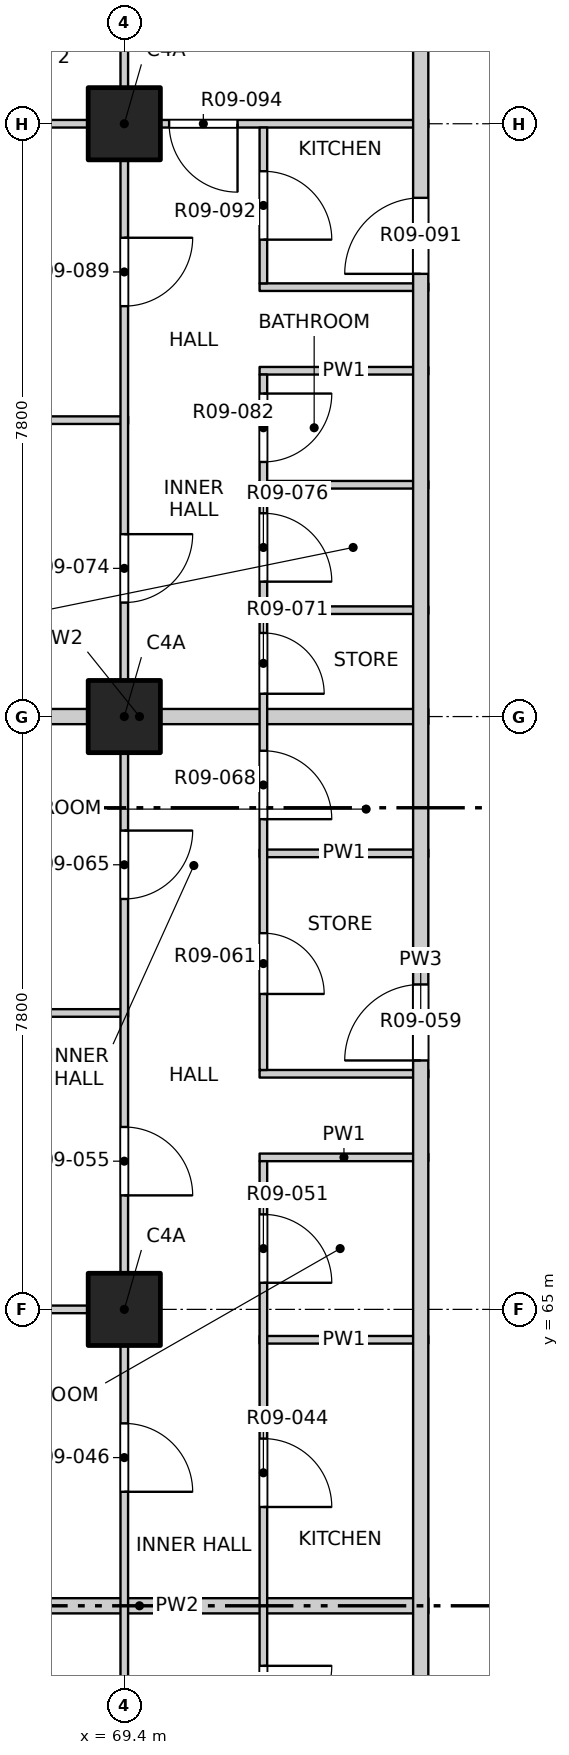
"""IFC4 building model, lengths in metres.
Left out: names, types, materials, properties, quantities, classifications, styles, units other than length and angle.
Written with IfcOpenShell. Run it as: python <this file> out.ifc"""

import sys

from ifc_helpers import new_model, si_unit, direction, frame, frame_2d, origin, origin_2d, place, context, subcontext, project, spatial, rectangle, extrude, element, fill, save


model = new_model("IFC4")
c1 = context("Model", 3, precision=1e-05, world=origin(), true_north=direction((0.0, 1.0)))
c2 = subcontext(c1, "Body", "Model", "MODEL_VIEW")
j1 = project(units=[si_unit("LENGTHUNIT", "METRE"), si_unit("PLANEANGLEUNIT", "RADIAN")], contexts=[c1])
p1 = place(None, origin())
s1 = spatial("IfcSite", under=j1, at=p1, CompositionType="ELEMENT")
p2 = place(p1, origin())
s2 = spatial("IfcBuilding", under=s1, at=p2, CompositionType="ELEMENT")
p3 = place(p2, frame((0.0, 0.0, 113.5)))
s3 = spatial("IfcBuildingStorey", under=s2, at=p3, CompositionType="ELEMENT", Elevation=113.5)
for number, where, z_axis, x_axis in (
    (1, (69.4, 65.0, -0.25), (0.0, 0.0, 1.0), (1.0, 0.0, 0.0)),
    (2, (69.4, 72.8, -0.25), (0.0, 0.0, 1.0), (1.0, 0.0, 0.0)),
    (3, (69.4, 80.6, -0.25), (0.0, 0.0, 1.0), (1.0, 0.0, 0.0)),
):
    element("IfcColumn", number, at=place(p3, frame(where, z_axis=z_axis, x_axis=x_axis)), inside=s3, PredefinedType="COLUMN", context=c2, shape_type="SweptSolid", body=[
        extrude(rectangle(XDim=0.95, YDim=0.95, at=origin_2d()), origin(), (0.0, 0.0, 1.0), 3.35),
    ])
p4 = place(p3, frame((65.8, 61.1, 0.0), z_axis=(0.0, 0.0, 1.0), x_axis=(1.0, 0.0, 0.0)))
e4 = element("IfcWall", 4, at=p4, inside=s3, PredefinedType="PARTITIONING", context=c2, shape_type="SweptSolid", body=[
    extrude(rectangle(XDim=7.6, YDim=0.2, at=frame_2d((3.8, 0.0))), origin(), (0.0, 0.0, 1.0), 3.1),
])
p5 = place(p3, frame((71.18, 64.6, 0.0), z_axis=(0.0, 0.0, 1.0), x_axis=(1.0, 0.0, 0.0)))
e5 = element("IfcWall", 5, at=p5, inside=s3, PredefinedType="PARTITIONING", context=c2, shape_type="SweptSolid", body=[
    extrude(rectangle(XDim=2.22, YDim=0.1, at=frame_2d((1.11, 0.0))), origin(), (0.0, 0.0, 1.0), 3.1),
])
p6 = place(p3, frame((65.8, 65.0, 0.0), z_axis=(0.0, 0.0, 1.0), x_axis=(1.0, 0.0, 0.0)))
e6 = element("IfcWall", 6, at=p6, inside=s3, PredefinedType="PARTITIONING", context=c2, shape_type="SweptSolid", body=[
    extrude(rectangle(XDim=3.65, YDim=0.1, at=frame_2d((1.825, 0.0))), origin(), (0.0, 0.0, 1.0), 3.1),
])
for number, where, z_axis, x_axis in (
    (7, (71.18, 67.0, 0.0), (0.0, 0.0, 1.0), (1.0, 0.0, 0.0)),
    (8, (71.18, 68.1, 0.0), (0.0, 0.0, 1.0), (1.0, 0.0, 0.0)),
):
    element("IfcWall", number, at=place(p3, frame(where, z_axis=z_axis, x_axis=x_axis)), inside=s3, PredefinedType="PARTITIONING", context=c2, shape_type="SweptSolid", body=[
        extrude(rectangle(XDim=2.22, YDim=0.1, at=frame_2d((1.11, 0.0))), origin(), (0.0, 0.0, 1.0), 3.1),
    ])
p7 = place(p3, frame((65.8, 68.9, 0.0), z_axis=(0.0, 0.0, 1.0), x_axis=(1.0, 0.0, 0.0)))
e9 = element("IfcWall", 9, at=p7, inside=s3, PredefinedType="PARTITIONING", context=c2, shape_type="SweptSolid", body=[
    extrude(rectangle(XDim=3.65, YDim=0.1, at=frame_2d((1.825, 0.0))), origin(), (0.0, 0.0, 1.0), 3.1),
])
p8 = place(p3, frame((71.18, 71.0, 0.0), z_axis=(0.0, 0.0, 1.0), x_axis=(1.0, 0.0, 0.0)))
e10 = element("IfcWall", 10, at=p8, inside=s3, PredefinedType="PARTITIONING", context=c2, shape_type="SweptSolid", body=[
    extrude(rectangle(XDim=2.22, YDim=0.1, at=frame_2d((1.11, 0.0))), origin(), (0.0, 0.0, 1.0), 3.1),
])
p9 = place(p3, frame((65.8, 72.8, 0.0), z_axis=(0.0, 0.0, 1.0), x_axis=(1.0, 0.0, 0.0)))
e11 = element("IfcWall", 11, at=p9, inside=s3, PredefinedType="PARTITIONING", context=c2, shape_type="SweptSolid", body=[
    extrude(rectangle(XDim=7.6, YDim=0.2, at=frame_2d((3.8, 0.0))), origin(), (0.0, 0.0, 1.0), 3.1),
])
for number, where, z_axis, x_axis in (
    (12, (71.18, 74.2, 0.0), (0.0, 0.0, 1.0), (1.0, 0.0, 0.0)),
    (13, (71.18, 75.85, 0.0), (0.0, 0.0, 1.0), (1.0, 0.0, 0.0)),
):
    element("IfcWall", number, at=place(p3, frame(where, z_axis=z_axis, x_axis=x_axis)), inside=s3, PredefinedType="PARTITIONING", context=c2, shape_type="SweptSolid", body=[
        extrude(rectangle(XDim=2.22, YDim=0.1, at=frame_2d((1.11, 0.0))), origin(), (0.0, 0.0, 1.0), 3.1),
    ])
p10 = place(p3, frame((65.8, 76.7, 0.0), z_axis=(0.0, 0.0, 1.0), x_axis=(1.0, 0.0, 0.0)))
e14 = element("IfcWall", 14, at=p10, inside=s3, PredefinedType="PARTITIONING", context=c2, shape_type="SweptSolid", body=[
    extrude(rectangle(XDim=3.65, YDim=0.1, at=frame_2d((1.825, 0.0))), origin(), (0.0, 0.0, 1.0), 3.1),
])
for number, where, z_axis, x_axis in (
    (15, (71.18, 77.35, 0.0), (0.0, 0.0, 1.0), (1.0, 0.0, 0.0)),
    (16, (71.18, 78.45, 0.0), (0.0, 0.0, 1.0), (1.0, 0.0, 0.0)),
):
    element("IfcWall", number, at=place(p3, frame(where, z_axis=z_axis, x_axis=x_axis)), inside=s3, PredefinedType="PARTITIONING", context=c2, shape_type="SweptSolid", body=[
        extrude(rectangle(XDim=2.22, YDim=0.1, at=frame_2d((1.11, 0.0))), origin(), (0.0, 0.0, 1.0), 3.1),
    ])
p11 = place(p3, frame((65.8, 80.6, 0.0), z_axis=(0.0, 0.0, 1.0), x_axis=(1.0, 0.0, 0.0)))
e17 = element("IfcWall", 17, at=p11, inside=s3, PredefinedType="PARTITIONING", context=c2, shape_type="SweptSolid", body=[
    extrude(rectangle(XDim=7.6, YDim=0.1, at=frame_2d((3.8, 0.0))), origin(), (0.0, 0.0, 1.0), 3.1),
])
p12 = place(p11, frame((4.19, 0.0, 0.0)))
e18 = element("IfcOpeningElement", 18, at=p12, cuts=e17, PredefinedType="OPENING", context=c2, shape_type="SweptSolid", body=[
    extrude(rectangle(XDim=0.9, YDim=2.1, at=frame_2d((0.45, 1.05))), frame((0.0, 0.06, 0.0), z_axis=(0.0, -1.0, 0.0), x_axis=(1.0, 0.0, 0.0)), (0.0, 0.0, 1.0), 0.12),
])
p13 = place(p3, frame((69.4, 45.8, 0.0), z_axis=(0.0, 0.0, 1.0), x_axis=(0.0, 1.0, 0.0)))
e19 = element("IfcWall", 19, at=p13, inside=s3, PredefinedType="PARTITIONING", context=c2, shape_type="SweptSolid", body=[
    extrude(rectangle(XDim=38.4, YDim=0.1, at=frame_2d((19.2, 0.0))), origin(), (0.0, 0.0, 1.0), 3.1),
])
p14 = place(p13, frame((1.05, 0.0, 0.0)))
e20 = element("IfcOpeningElement", 20, at=p14, cuts=e19, PredefinedType="OPENING", context=c2, shape_type="SweptSolid", body=[
    extrude(rectangle(XDim=1.2, YDim=2.1, at=frame_2d((0.6, 1.05))), frame((0.0, 0.06, 0.0), z_axis=(0.0, -1.0, 0.0), x_axis=(1.0, 0.0, 0.0)), (0.0, 0.0, 1.0), 0.12),
])
p15 = place(p13, frame((5.1, 0.0, 0.0)))
e21 = element("IfcOpeningElement", 21, at=p15, cuts=e19, PredefinedType="OPENING", context=c2, shape_type="SweptSolid", body=[
    extrude(rectangle(XDim=0.9, YDim=2.1, at=frame_2d((0.45, 1.05))), frame((0.0, 0.06, 0.0), z_axis=(0.0, -1.0, 0.0), x_axis=(1.0, 0.0, 0.0)), (0.0, 0.0, 1.0), 0.12),
])
p16 = place(p13, frame((9.0, 0.0, 0.0)))
e22 = element("IfcOpeningElement", 22, at=p16, cuts=e19, PredefinedType="OPENING", context=c2, shape_type="SweptSolid", body=[
    extrude(rectangle(XDim=0.9, YDim=2.1, at=frame_2d((0.45, 1.05))), frame((0.0, 0.06, 0.0), z_axis=(0.0, -1.0, 0.0), x_axis=(1.0, 0.0, 0.0)), (0.0, 0.0, 1.0), 0.12),
])
p17 = place(p13, frame((12.9, 0.0, 0.0)))
e23 = element("IfcOpeningElement", 23, at=p17, cuts=e19, PredefinedType="OPENING", context=c2, shape_type="SweptSolid", body=[
    extrude(rectangle(XDim=0.9, YDim=2.1, at=frame_2d((0.45, 1.05))), frame((0.0, 0.06, 0.0), z_axis=(0.0, -1.0, 0.0), x_axis=(1.0, 0.0, 0.0)), (0.0, 0.0, 1.0), 0.12),
])
p18 = place(p13, frame((16.8, 0.0, 0.0)))
e24 = element("IfcOpeningElement", 24, at=p18, cuts=e19, PredefinedType="OPENING", context=c2, shape_type="SweptSolid", body=[
    extrude(rectangle(XDim=0.9, YDim=2.1, at=frame_2d((0.45, 1.05))), frame((0.0, 0.06, 0.0), z_axis=(0.0, -1.0, 0.0), x_axis=(1.0, 0.0, 0.0)), (0.0, 0.0, 1.0), 0.12),
])
p19 = place(p13, frame((20.7, 0.0, 0.0)))
e25 = element("IfcOpeningElement", 25, at=p19, cuts=e19, PredefinedType="OPENING", context=c2, shape_type="SweptSolid", body=[
    extrude(rectangle(XDim=0.9, YDim=2.1, at=frame_2d((0.45, 1.05))), frame((0.0, 0.06, 0.0), z_axis=(0.0, -1.0, 0.0), x_axis=(1.0, 0.0, 0.0)), (0.0, 0.0, 1.0), 0.12),
])
p20 = place(p13, frame((24.6, 0.0, 0.0)))
e26 = element("IfcOpeningElement", 26, at=p20, cuts=e19, PredefinedType="OPENING", context=c2, shape_type="SweptSolid", body=[
    extrude(rectangle(XDim=0.9, YDim=2.1, at=frame_2d((0.45, 1.05))), frame((0.0, 0.06, 0.0), z_axis=(0.0, -1.0, 0.0), x_axis=(1.0, 0.0, 0.0)), (0.0, 0.0, 1.0), 0.12),
])
p21 = place(p13, frame((28.5, 0.0, 0.0)))
e27 = element("IfcOpeningElement", 27, at=p21, cuts=e19, PredefinedType="OPENING", context=c2, shape_type="SweptSolid", body=[
    extrude(rectangle(XDim=0.9, YDim=2.1, at=frame_2d((0.45, 1.05))), frame((0.0, 0.06, 0.0), z_axis=(0.0, -1.0, 0.0), x_axis=(1.0, 0.0, 0.0)), (0.0, 0.0, 1.0), 0.12),
])
p22 = place(p13, frame((32.4, 0.0, 0.0)))
e28 = element("IfcOpeningElement", 28, at=p22, cuts=e19, PredefinedType="OPENING", context=c2, shape_type="SweptSolid", body=[
    extrude(rectangle(XDim=0.9, YDim=2.1, at=frame_2d((0.45, 1.05))), frame((0.0, 0.06, 0.0), z_axis=(0.0, -1.0, 0.0), x_axis=(1.0, 0.0, 0.0)), (0.0, 0.0, 1.0), 0.12),
])
p23 = place(p13, frame((36.15, 0.0, 0.0)))
e29 = element("IfcOpeningElement", 29, at=p23, cuts=e19, PredefinedType="OPENING", context=c2, shape_type="SweptSolid", body=[
    extrude(rectangle(XDim=1.2, YDim=2.1, at=frame_2d((0.6, 1.05))), frame((0.0, 0.06, 0.0), z_axis=(0.0, -1.0, 0.0), x_axis=(1.0, 0.0, 0.0)), (0.0, 0.0, 1.0), 0.12),
])
p24 = place(p3, frame((71.23, 55.3, 0.0), z_axis=(0.0, 0.0, 1.0), x_axis=(0.0, 1.0, 0.0)))
e30 = element("IfcWall", 30, at=p24, inside=s3, PredefinedType="PARTITIONING", context=c2, shape_type="SweptSolid", body=[
    extrude(rectangle(XDim=11.65, YDim=0.1, at=frame_2d((5.825, 0.0))), origin(), (0.0, 0.0, 1.0), 3.1),
])
p25 = place(p24, frame((1.185, 0.0, 0.0)))
e31 = element("IfcOpeningElement", 31, at=p25, cuts=e30, PredefinedType="OPENING", context=c2, shape_type="SweptSolid", body=[
    extrude(rectangle(XDim=0.9, YDim=2.1, at=frame_2d((0.45, 1.05))), frame((0.0, 0.06, 0.0), z_axis=(0.0, -1.0, 0.0), x_axis=(1.0, 0.0, 0.0)), (0.0, 0.0, 1.0), 0.12),
])
p26 = place(p24, frame((4.11, 0.0, 0.0)))
e32 = element("IfcOpeningElement", 32, at=p26, cuts=e30, PredefinedType="OPENING", context=c2, shape_type="SweptSolid", body=[
    extrude(rectangle(XDim=0.9, YDim=2.1, at=frame_2d((0.45, 1.05))), frame((0.0, 0.06, 0.0), z_axis=(0.0, -1.0, 0.0), x_axis=(1.0, 0.0, 0.0)), (0.0, 0.0, 1.0), 0.12),
])
p27 = place(p24, frame((7.1, 0.0, 0.0)))
e33 = element("IfcOpeningElement", 33, at=p27, cuts=e30, PredefinedType="OPENING", context=c2, shape_type="SweptSolid", body=[
    extrude(rectangle(XDim=0.9, YDim=2.1, at=frame_2d((0.45, 1.05))), frame((0.0, 0.06, 0.0), z_axis=(0.0, -1.0, 0.0), x_axis=(1.0, 0.0, 0.0)), (0.0, 0.0, 1.0), 0.12),
])
p28 = place(p24, frame((10.05, 0.0, 0.0)))
e34 = element("IfcOpeningElement", 34, at=p28, cuts=e30, PredefinedType="OPENING", context=c2, shape_type="SweptSolid", body=[
    extrude(rectangle(XDim=0.9, YDim=2.1, at=frame_2d((0.45, 1.05))), frame((0.0, 0.06, 0.0), z_axis=(0.0, -1.0, 0.0), x_axis=(1.0, 0.0, 0.0)), (0.0, 0.0, 1.0), 0.12),
])
p29 = place(p3, frame((71.23, 68.15, 0.0), z_axis=(0.0, 0.0, 1.0), x_axis=(0.0, 1.0, 0.0)))
e35 = element("IfcWall", 35, at=p29, inside=s3, PredefinedType="PARTITIONING", context=c2, shape_type="SweptSolid", body=[
    extrude(rectangle(XDim=9.15, YDim=0.1, at=frame_2d((4.575, 0.0))), origin(), (0.0, 0.0, 1.0), 3.1),
])
p30 = place(p29, frame((1.0, 0.0, 0.0)))
e36 = element("IfcOpeningElement", 36, at=p30, cuts=e35, PredefinedType="OPENING", context=c2, shape_type="SweptSolid", body=[
    extrude(rectangle(XDim=0.8, YDim=2.1, at=frame_2d((0.4, 1.05))), frame((0.0, 0.06, 0.0), z_axis=(0.0, -1.0, 0.0), x_axis=(1.0, 0.0, 0.0)), (0.0, 0.0, 1.0), 0.12),
])
p31 = place(p29, frame((3.3, 0.0, 0.0)))
e37 = element("IfcOpeningElement", 37, at=p31, cuts=e35, PredefinedType="OPENING", context=c2, shape_type="SweptSolid", body=[
    extrude(rectangle(XDim=0.9, YDim=2.1, at=frame_2d((0.45, 1.05))), frame((0.0, 0.06, 0.0), z_axis=(0.0, -1.0, 0.0), x_axis=(1.0, 0.0, 0.0)), (0.0, 0.0, 1.0), 0.12),
])
p32 = place(p29, frame((4.95, 0.0, 0.0)))
e38 = element("IfcOpeningElement", 38, at=p32, cuts=e35, PredefinedType="OPENING", context=c2, shape_type="SweptSolid", body=[
    extrude(rectangle(XDim=0.8, YDim=2.1, at=frame_2d((0.4, 1.05))), frame((0.0, 0.06, 0.0), z_axis=(0.0, -1.0, 0.0), x_axis=(1.0, 0.0, 0.0)), (0.0, 0.0, 1.0), 0.12),
])
p33 = place(p29, frame((6.425, 0.0, 0.0)))
e39 = element("IfcOpeningElement", 39, at=p33, cuts=e35, PredefinedType="OPENING", context=c2, shape_type="SweptSolid", body=[
    extrude(rectangle(XDim=0.9, YDim=2.1, at=frame_2d((0.45, 1.05))), frame((0.0, 0.06, 0.0), z_axis=(0.0, -1.0, 0.0), x_axis=(1.0, 0.0, 0.0)), (0.0, 0.0, 1.0), 0.12),
])
p34 = place(p29, frame((8.0, 0.0, 0.0)))
e40 = element("IfcOpeningElement", 40, at=p34, cuts=e35, PredefinedType="OPENING", context=c2, shape_type="SweptSolid", body=[
    extrude(rectangle(XDim=0.9, YDim=2.1, at=frame_2d((0.45, 1.05))), frame((0.0, 0.06, 0.0), z_axis=(0.0, -1.0, 0.0), x_axis=(1.0, 0.0, 0.0)), (0.0, 0.0, 1.0), 0.12),
])
p35 = place(p3, frame((71.23, 78.5, 0.0), z_axis=(0.0, 0.0, 1.0), x_axis=(0.0, 1.0, 0.0)))
e41 = element("IfcWall", 41, at=p35, inside=s3, PredefinedType="PARTITIONING", context=c2, shape_type="SweptSolid", body=[
    extrude(rectangle(XDim=2.05, YDim=0.1, at=frame_2d((1.025, 0.0))), origin(), (0.0, 0.0, 1.0), 3.1),
])
p36 = place(p35, frame((0.575, 0.0, 0.0)))
e42 = element("IfcOpeningElement", 42, at=p36, cuts=e41, PredefinedType="OPENING", context=c2, shape_type="SweptSolid", body=[
    extrude(rectangle(XDim=0.9, YDim=2.1, at=frame_2d((0.45, 1.05))), frame((0.0, 0.06, 0.0), z_axis=(0.0, -1.0, 0.0), x_axis=(1.0, 0.0, 0.0)), (0.0, 0.0, 1.0), 0.12),
])
p37 = place(p3, frame((73.3, 53.4, 0.0), z_axis=(0.0, 0.0, 1.0), x_axis=(0.0, 1.0, 0.0)))
e43 = element("IfcWall", 43, at=p37, inside=s3, PredefinedType="PARTITIONING", context=c2, shape_type="SweptSolid", body=[
    extrude(rectangle(XDim=30.8, YDim=0.2, at=frame_2d((15.4, 0.0))), origin(), (0.0, 0.0, 1.0), 3.1),
])
p38 = place(p37, frame((2.025, 0.0, 0.0)))
e44 = element("IfcOpeningElement", 44, at=p38, cuts=e43, PredefinedType="OPENING", context=c2, shape_type="SweptSolid", body=[
    extrude(rectangle(XDim=1.0, YDim=2.1, at=frame_2d((0.5, 1.05))), frame((0.0, 0.11, 0.0), z_axis=(0.0, -1.0, 0.0), x_axis=(1.0, 0.0, 0.0)), (0.0, 0.0, 1.0), 0.22),
])
p39 = place(p37, frame((14.875, 0.0, 0.0)))
e45 = element("IfcOpeningElement", 45, at=p39, cuts=e43, PredefinedType="OPENING", context=c2, shape_type="SweptSolid", body=[
    extrude(rectangle(XDim=1.0, YDim=2.1, at=frame_2d((0.5, 1.05))), frame((0.0, 0.11, 0.0), z_axis=(0.0, -1.0, 0.0), x_axis=(1.0, 0.0, 0.0)), (0.0, 0.0, 1.0), 0.22),
])
p40 = place(p37, frame((25.225, 0.0, 0.0)))
e46 = element("IfcOpeningElement", 46, at=p40, cuts=e43, PredefinedType="OPENING", context=c2, shape_type="SweptSolid", body=[
    extrude(rectangle(XDim=1.0, YDim=2.1, at=frame_2d((0.5, 1.05))), frame((0.0, 0.11, 0.0), z_axis=(0.0, -1.0, 0.0), x_axis=(1.0, 0.0, 0.0)), (0.0, 0.0, 1.0), 0.22),
])
p41 = place(p26, origin())
e47 = element("IfcDoor", 47, at=p41, inside=s3, OperationType="SINGLE_SWING_LEFT", PredefinedType="DOOR", context=c2, shape_type="SweptSolid", body=[
    extrude(rectangle(XDim=0.9, YDim=2.1, at=frame_2d((0.45, 1.05))), frame((0.0, 0.025, 0.0), z_axis=(0.0, -1.0, 0.0), x_axis=(1.0, 0.0, 0.0)), (0.0, 0.0, 1.0), 0.05),
])
fill(e32, e47)
p42 = place(p27, origin())
e48 = element("IfcDoor", 48, at=p42, inside=s3, OperationType="SINGLE_SWING_RIGHT", PredefinedType="DOOR", context=c2, shape_type="SweptSolid", body=[
    extrude(rectangle(XDim=0.9, YDim=2.1, at=frame_2d((0.45, 1.05))), frame((0.0, 0.025, 0.0), z_axis=(0.0, -1.0, 0.0), x_axis=(1.0, 0.0, 0.0)), (0.0, 0.0, 1.0), 0.05),
])
fill(e33, e48)
p43 = place(p18, origin())
e49 = element("IfcDoor", 49, at=p43, inside=s3, OperationType="SINGLE_SWING_RIGHT", PredefinedType="DOOR", context=c2, shape_type="SweptSolid", body=[
    extrude(rectangle(XDim=0.9, YDim=2.1, at=frame_2d((0.45, 1.05))), frame((0.0, 0.025, 0.0), z_axis=(0.0, -1.0, 0.0), x_axis=(1.0, 0.0, 0.0)), (0.0, 0.0, 1.0), 0.05),
])
fill(e24, e49)
p44 = place(p28, origin())
e50 = element("IfcDoor", 50, at=p44, inside=s3, OperationType="SINGLE_SWING_RIGHT", PredefinedType="DOOR", context=c2, shape_type="SweptSolid", body=[
    extrude(rectangle(XDim=0.9, YDim=2.1, at=frame_2d((0.45, 1.05))), frame((0.0, 0.025, 0.0), z_axis=(0.0, -1.0, 0.0), x_axis=(1.0, 0.0, 0.0)), (0.0, 0.0, 1.0), 0.05),
])
fill(e34, e50)
p45 = place(p19, origin())
e51 = element("IfcDoor", 51, at=p45, inside=s3, OperationType="SINGLE_SWING_RIGHT", PredefinedType="DOOR", context=c2, shape_type="SweptSolid", body=[
    extrude(rectangle(XDim=0.9, YDim=2.1, at=frame_2d((0.45, 1.05))), frame((0.0, 0.025, 0.0), z_axis=(0.0, -1.0, 0.0), x_axis=(1.0, 0.0, 0.0)), (0.0, 0.0, 1.0), 0.05),
])
fill(e25, e51)
p46 = place(p39, origin())
e52 = element("IfcDoor", 52, at=p46, inside=s3, OperationType="SINGLE_SWING_RIGHT", PredefinedType="DOOR", context=c2, shape_type="SweptSolid", body=[
    extrude(rectangle(XDim=1.0, YDim=2.1, at=frame_2d((0.5, 1.05))), frame((0.0, 0.025, 0.0), z_axis=(0.0, -1.0, 0.0), x_axis=(1.0, 0.0, 0.0)), (0.0, 0.0, 1.0), 0.05),
])
fill(e45, e52)
p47 = place(p30, origin())
e53 = element("IfcDoor", 53, at=p47, inside=s3, OperationType="SINGLE_SWING_RIGHT", PredefinedType="DOOR", context=c2, shape_type="SweptSolid", body=[
    extrude(rectangle(XDim=0.8, YDim=2.1, at=frame_2d((0.4, 1.05))), frame((0.0, 0.025, 0.0), z_axis=(0.0, -1.0, 0.0), x_axis=(1.0, 0.0, 0.0)), (0.0, 0.0, 1.0), 0.05),
])
fill(e36, e53)
p48 = place(p20, origin())
e54 = element("IfcDoor", 54, at=p48, inside=s3, OperationType="SINGLE_SWING_LEFT", PredefinedType="DOOR", context=c2, shape_type="SweptSolid", body=[
    extrude(rectangle(XDim=0.9, YDim=2.1, at=frame_2d((0.45, 1.05))), frame((0.0, 0.025, 0.0), z_axis=(0.0, -1.0, 0.0), x_axis=(1.0, 0.0, 0.0)), (0.0, 0.0, 1.0), 0.05),
])
fill(e26, e54)
p49 = place(p31, origin())
e55 = element("IfcDoor", 55, at=p49, inside=s3, OperationType="SINGLE_SWING_RIGHT", PredefinedType="DOOR", context=c2, shape_type="SweptSolid", body=[
    extrude(rectangle(XDim=0.9, YDim=2.1, at=frame_2d((0.45, 1.05))), frame((0.0, 0.025, 0.0), z_axis=(0.0, -1.0, 0.0), x_axis=(1.0, 0.0, 0.0)), (0.0, 0.0, 1.0), 0.05),
])
fill(e37, e55)
p50 = place(p32, origin())
e56 = element("IfcDoor", 56, at=p50, inside=s3, OperationType="SINGLE_SWING_RIGHT", PredefinedType="DOOR", context=c2, shape_type="SweptSolid", body=[
    extrude(rectangle(XDim=0.8, YDim=2.1, at=frame_2d((0.4, 1.05))), frame((0.0, 0.025, 0.0), z_axis=(0.0, -1.0, 0.0), x_axis=(1.0, 0.0, 0.0)), (0.0, 0.0, 1.0), 0.05),
])
fill(e38, e56)
p51 = place(p21, origin())
e57 = element("IfcDoor", 57, at=p51, inside=s3, OperationType="SINGLE_SWING_LEFT", PredefinedType="DOOR", context=c2, shape_type="SweptSolid", body=[
    extrude(rectangle(XDim=0.9, YDim=2.1, at=frame_2d((0.45, 1.05))), frame((0.0, 0.025, 0.0), z_axis=(0.0, -1.0, 0.0), x_axis=(1.0, 0.0, 0.0)), (0.0, 0.0, 1.0), 0.05),
])
fill(e27, e57)
p52 = place(p33, origin())
e58 = element("IfcDoor", 58, at=p52, inside=s3, OperationType="SINGLE_SWING_RIGHT", PredefinedType="DOOR", context=c2, shape_type="SweptSolid", body=[
    extrude(rectangle(XDim=0.9, YDim=2.1, at=frame_2d((0.45, 1.05))), frame((0.0, 0.025, 0.0), z_axis=(0.0, -1.0, 0.0), x_axis=(1.0, 0.0, 0.0)), (0.0, 0.0, 1.0), 0.05),
])
fill(e39, e58)
p53 = place(p34, origin())
e59 = element("IfcDoor", 59, at=p53, inside=s3, OperationType="SINGLE_SWING_LEFT", PredefinedType="DOOR", context=c2, shape_type="SweptSolid", body=[
    extrude(rectangle(XDim=0.9, YDim=2.1, at=frame_2d((0.45, 1.05))), frame((0.0, 0.025, 0.0), z_axis=(0.0, -1.0, 0.0), x_axis=(1.0, 0.0, 0.0)), (0.0, 0.0, 1.0), 0.05),
])
fill(e40, e59)
p54 = place(p22, origin())
e60 = element("IfcDoor", 60, at=p54, inside=s3, OperationType="SINGLE_SWING_LEFT", PredefinedType="DOOR", context=c2, shape_type="SweptSolid", body=[
    extrude(rectangle(XDim=0.9, YDim=2.1, at=frame_2d((0.45, 1.05))), frame((0.0, 0.025, 0.0), z_axis=(0.0, -1.0, 0.0), x_axis=(1.0, 0.0, 0.0)), (0.0, 0.0, 1.0), 0.05),
])
fill(e28, e60)
p55 = place(p40, origin())
e61 = element("IfcDoor", 61, at=p55, inside=s3, OperationType="SINGLE_SWING_RIGHT", PredefinedType="DOOR", context=c2, shape_type="SweptSolid", body=[
    extrude(rectangle(XDim=1.0, YDim=2.1, at=frame_2d((0.5, 1.05))), frame((0.0, 0.025, 0.0), z_axis=(0.0, -1.0, 0.0), x_axis=(1.0, 0.0, 0.0)), (0.0, 0.0, 1.0), 0.05),
])
fill(e46, e61)
p56 = place(p36, origin())
e62 = element("IfcDoor", 62, at=p56, inside=s3, OperationType="SINGLE_SWING_RIGHT", PredefinedType="DOOR", context=c2, shape_type="SweptSolid", body=[
    extrude(rectangle(XDim=0.9, YDim=2.1, at=frame_2d((0.45, 1.05))), frame((0.0, 0.025, 0.0), z_axis=(0.0, -1.0, 0.0), x_axis=(1.0, 0.0, 0.0)), (0.0, 0.0, 1.0), 0.05),
])
fill(e42, e62)
p57 = place(p12, origin())
e63 = element("IfcDoor", 63, at=p57, inside=s3, OperationType="SINGLE_SWING_LEFT", PredefinedType="DOOR", context=c2, shape_type="SweptSolid", body=[
    extrude(rectangle(XDim=0.9, YDim=2.1, at=frame_2d((0.45, 1.05))), frame((0.0, 0.025, 0.0), z_axis=(0.0, -1.0, 0.0), x_axis=(1.0, 0.0, 0.0)), (0.0, 0.0, 1.0), 0.05),
])
fill(e18, e63)
save(model, sys.argv[1])
